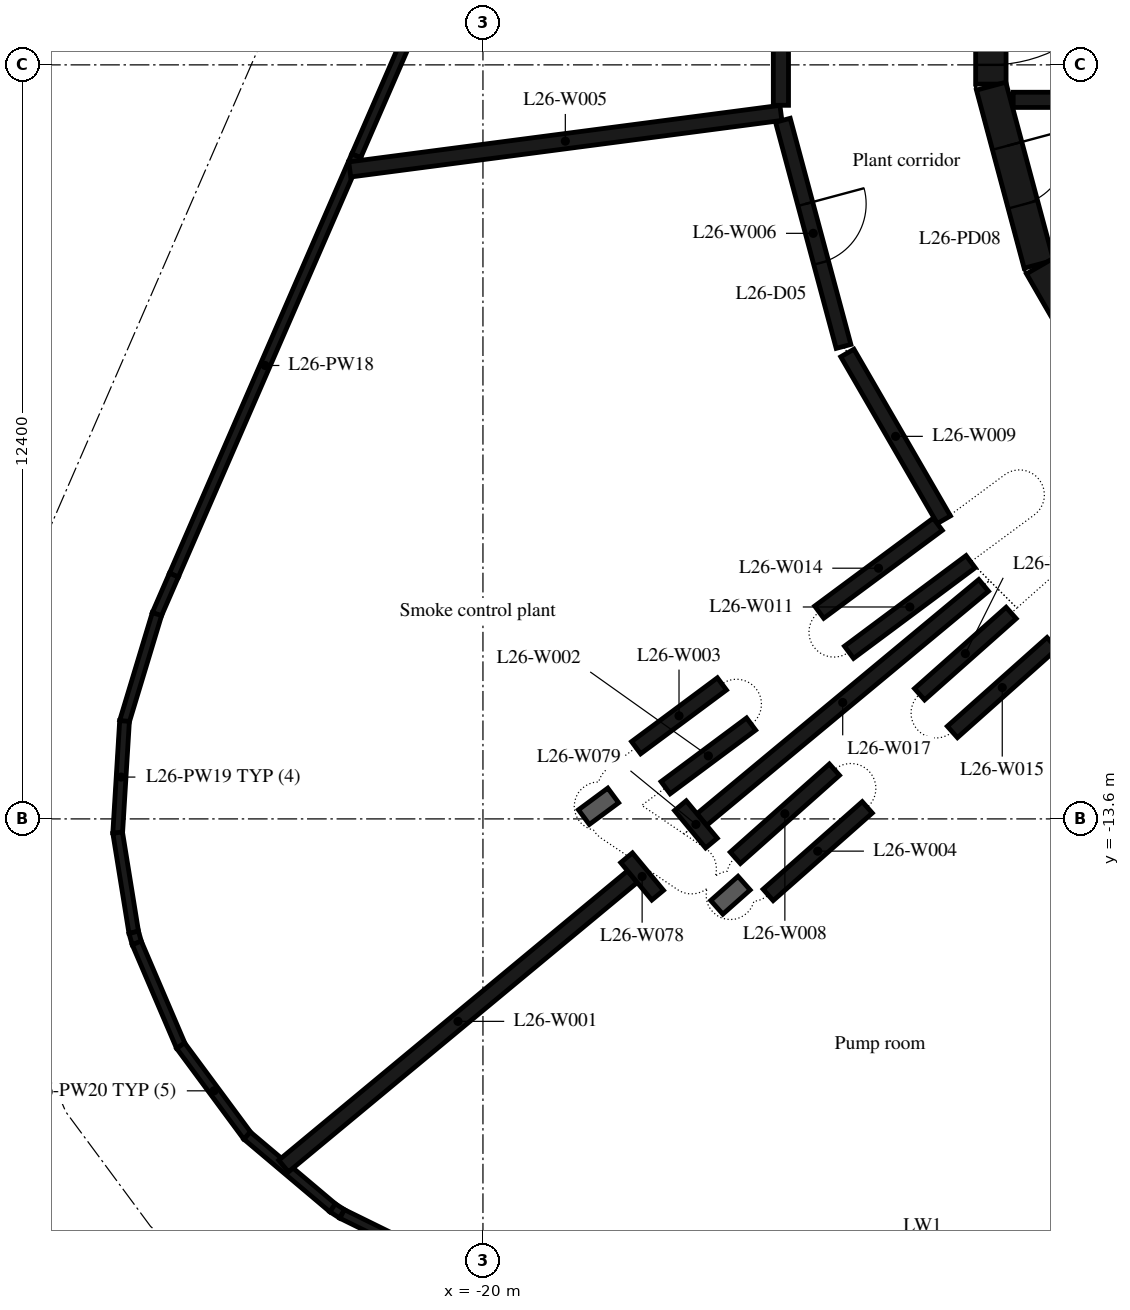
"""IFC4 building model, lengths in metres.
Left out: names, types, materials, properties, quantities, classifications, styles, units other than length and angle.
Written with IfcOpenShell. Run it as: python <this file> out.ifc"""

import sys

from ifc_helpers import new_model, si_unit, direction, frame, frame_2d, origin, place, context, subcontext, project, spatial, rectangle, extrude, element, fill, save


model = new_model("IFC4")
c1 = context("Model", 3, precision=1e-05, world=origin(), true_north=direction((0.0, 1.0)))
c2 = subcontext(c1, "Body", "Model", "MODEL_VIEW")
j1 = project(units=[si_unit("LENGTHUNIT", "METRE"), si_unit("PLANEANGLEUNIT", "RADIAN")], contexts=[c1])
p1 = place(None, origin())
s1 = spatial("IfcSite", under=j1, at=p1, CompositionType="ELEMENT")
p2 = place(p1, origin())
s2 = spatial("IfcBuilding", under=s1, at=p2, CompositionType="ELEMENT")
p3 = place(p2, frame((0.0, 0.0, 108.2)))
s3 = spatial("IfcBuildingStorey", under=s2, at=p3, CompositionType="ELEMENT", Elevation=108.2)
p4 = place(p3, frame((-19.086, 4.199, 0.0), z_axis=(0.0, 0.0, 1.0), x_axis=(-0.398765291981, -0.917053020229, 0.0)))
e1 = element("IfcWall", 1, at=p4, inside=s3, PredefinedType="STANDARD", context=c2, shape_type="SweptSolid", body=[
    extrude(rectangle(XDim=7.519, YDim=0.16, at=frame_2d((3.76, 0.0))), origin(), (0.0, 0.0, 1.0), 4.75),
])
p5 = place(p3, frame((-22.084, -2.696, 0.0), z_axis=(0.0, 0.0, 1.0), x_axis=(-0.398737984544, -0.917064893932, 0.0)))
e2 = element("IfcWall", 2, at=p5, inside=s3, PredefinedType="STANDARD", context=c2, shape_type="SweptSolid", body=[
    extrude(rectangle(XDim=7.519, YDim=0.16, at=frame_2d((3.759, 0.0))), origin(), (0.0, 0.0, 1.0), 4.75),
])
p6 = place(p3, frame((-25.082, -9.591, 0.0), z_axis=(0.0, 0.0, 1.0), x_axis=(-0.398561214502, -0.917141732937, 0.0)))
e3 = element("IfcWall", 3, at=p6, inside=s3, PredefinedType="STANDARD", context=c2, shape_type="SweptSolid", body=[
    extrude(rectangle(XDim=0.704, YDim=0.16, at=frame_2d((0.352, 0.0))), origin(), (0.0, 0.0, 1.0), 4.75),
])
p7 = place(p3, frame((-25.361, -10.232, 0.0), z_axis=(0.0, 0.0, 1.0), x_axis=(-0.289640305578, -0.957135566879, 0.0)))
e4 = element("IfcWall", 4, at=p7, inside=s3, PredefinedType="STANDARD", context=c2, shape_type="SweptSolid", body=[
    extrude(rectangle(XDim=1.846, YDim=0.16, at=frame_2d((0.923, 0.0))), origin(), (0.0, 0.0, 1.0), 4.75),
])
p8 = place(p3, frame((-25.894, -11.99, 0.0), z_axis=(0.0, 0.0, 1.0), x_axis=(-0.061029488501, -0.998135963451, 0.0)))
e5 = element("IfcWall", 5, at=p8, inside=s3, PredefinedType="STANDARD", context=c2, shape_type="SweptSolid", body=[
    extrude(rectangle(XDim=1.848, YDim=0.16, at=frame_2d((0.924, 0.0))), origin(), (0.0, 0.0, 1.0), 4.75),
])
p9 = place(p3, frame((-26.008, -13.826, 0.0), z_axis=(0.0, 0.0, 1.0), x_axis=(0.159320235268, -0.98722695599, 0.0)))
e6 = element("IfcWall", 6, at=p9, inside=s3, PredefinedType="STANDARD", context=c2, shape_type="SweptSolid", body=[
    extrude(rectangle(XDim=1.661, YDim=0.16, at=frame_2d((0.831, 0.0))), origin(), (0.0, 0.0, 1.0), 4.75),
])
p10 = place(p3, frame((-25.743, -15.466, 0.0), z_axis=(0.0, 0.0, 1.0), x_axis=(0.274547625783, -0.961573502743, 0.0)))
e7 = element("IfcWall", 7, at=p10, inside=s3, PredefinedType="STANDARD", context=c2, shape_type="SweptSolid", body=[
    extrude(rectangle(XDim=0.186, YDim=0.16, at=frame_2d((0.093, 0.0))), origin(), (0.0, 0.0, 1.0), 4.75),
])
p11 = place(p3, frame((-25.694, -15.639, 0.0), z_axis=(0.0, 0.0, 1.0), x_axis=(0.393376641472, -0.919377407784, 0.0)))
e8 = element("IfcWall", 8, at=p11, inside=s3, PredefinedType="STANDARD", context=c2, shape_type="SweptSolid", body=[
    extrude(rectangle(XDim=1.846, YDim=0.16, at=frame_2d((0.923, 0.0))), origin(), (0.0, 0.0, 1.0), 4.75),
])
p12 = place(p3, frame((-24.972, -17.329, 0.0), z_axis=(0.0, 0.0, 1.0), x_axis=(0.594788380253, -0.803882318947, 0.0)))
e9 = element("IfcWall", 9, at=p12, inside=s3, PredefinedType="STANDARD", context=c2, shape_type="SweptSolid", body=[
    extrude(rectangle(XDim=1.848, YDim=0.16, at=frame_2d((0.924, 0.0))), origin(), (0.0, 0.0, 1.0), 4.75),
])
p13 = place(p3, frame((-23.879, -18.808, 0.0), z_axis=(0.0, 0.0, 1.0), x_axis=(0.76410813609, -0.645088177198, 0.0)))
e10 = element("IfcWall", 10, at=p13, inside=s3, PredefinedType="STANDARD", context=c2, shape_type="SweptSolid", body=[
    extrude(rectangle(XDim=1.846, YDim=0.16, at=frame_2d((0.923, 0.0))), origin(), (0.0, 0.0, 1.0), 4.75),
])
p14 = place(p3, frame((-22.472, -19.995, 0.0), z_axis=(0.0, 0.0, 1.0), x_axis=(0.840238765122, -0.542216578118, 0.0)))
e11 = element("IfcWall", 11, at=p14, inside=s3, PredefinedType="STANDARD", context=c2, shape_type="SweptSolid", body=[
    extrude(rectangle(XDim=0.186, YDim=0.16, at=frame_2d((0.093, 0.0))), origin(), (0.0, 0.0, 1.0), 4.75),
])
p15 = place(p3, frame((-22.316, -20.096, 0.0), z_axis=(0.0, 0.0, 1.0), x_axis=(0.897492078532, -0.441030576007, 0.0)))
e12 = element("IfcWall", 12, at=p15, inside=s3, PredefinedType="STANDARD", context=c2, shape_type="SweptSolid", body=[
    extrude(rectangle(XDim=1.661, YDim=0.16, at=frame_2d((0.831, 0.0))), origin(), (0.0, 0.0, 1.0), 4.75),
])
p16 = place(p3, frame((-16.505, -21.182, 0.0), z_axis=(0.0, 0.0, 1.0), x_axis=(0.993573424553, 0.113189443072, 0.0)))
e13 = element("IfcWall", 13, at=p16, inside=s3, PredefinedType="STANDARD", context=c2, shape_type="SweptSolid", body=[
    extrude(rectangle(XDim=7.519, YDim=0.16, at=frame_2d((3.76, 0.0))), origin(), (0.0, 0.0, 1.0), 4.75),
])
p17 = place(p16, frame((2.26, 0.0, 1.0)))
e14 = element("IfcOpeningElement", 14, at=p17, cuts=e13, PredefinedType="OPENING", context=c2, shape_type="SweptSolid", body=[
    extrude(rectangle(XDim=3.0, YDim=2.2, at=frame_2d((1.5, 1.1))), frame((0.0, 0.09, 0.0), z_axis=(0.0, -1.0, 0.0), x_axis=(1.0, 0.0, 0.0)), (0.0, 0.0, 1.0), 0.18),
])
p18 = place(p3, frame((-11.647, 1.516, 0.0), z_axis=(0.0, 0.0, 1.0), x_axis=(0.0, -1.0, 0.0)))
e15 = element("IfcWall", 15, at=p18, inside=s3, PredefinedType="SHEAR", context=c2, shape_type="SweptSolid", body=[
    extrude(rectangle(XDim=3.033, YDim=0.5, at=frame_2d((1.516, 0.0))), origin(), (0.0, 0.0, 1.0), 4.75),
])
p19 = place(p18, frame((0.316, 0.0, 0.0)))
e16 = element("IfcOpeningElement", 16, at=p19, cuts=e15, PredefinedType="OPENING", context=c2, shape_type="SweptSolid", body=[
    extrude(rectangle(XDim=2.4, YDim=2.1, at=frame_2d((1.2, 1.05))), frame((0.0, 0.26, 0.0), z_axis=(0.0, -1.0, 0.0), x_axis=(1.0, 0.0, 0.0)), (0.0, 0.0, 1.0), 0.52),
])
p20 = place(p3, frame((-11.643, -1.55, 0.0), z_axis=(0.0, 0.0, 1.0), x_axis=(0.258734743916, -0.965948410781, 0.0)))
e17 = element("IfcWall", 17, at=p20, inside=s3, PredefinedType="SHEAR", context=c2, shape_type="SweptSolid", body=[
    extrude(rectangle(XDim=3.033, YDim=0.5, at=frame_2d((1.516, 0.0))), origin(), (0.0, 0.0, 1.0), 4.75),
])
p21 = place(p20, frame((1.016, 0.0, 0.0)))
e18 = element("IfcOpeningElement", 18, at=p21, cuts=e17, PredefinedType="OPENING", context=c2, shape_type="SweptSolid", body=[
    extrude(rectangle(XDim=1.0, YDim=2.4, at=frame_2d((0.5, 1.2))), frame((0.0, 0.26, 0.0), z_axis=(0.0, -1.0, 0.0), x_axis=(1.0, 0.0, 0.0)), (0.0, 0.0, 1.0), 0.52),
])
p22 = place(p3, frame((-10.845, -4.51, 0.0), z_axis=(0.0, 0.0, 1.0), x_axis=(0.500087131594, -0.865975092491, 0.0)))
e19 = element("IfcWall", 19, at=p22, inside=s3, PredefinedType="SHEAR", context=c2, shape_type="SweptSolid", body=[
    extrude(rectangle(XDim=3.033, YDim=0.5, at=frame_2d((1.516, 0.0))), origin(), (0.0, 0.0, 1.0), 4.75),
])
p23 = place(p3, frame((-11.28, -1.775, 0.0), z_axis=(0.0, 0.0, 1.0), x_axis=(1.0, 0.0, 0.0)))
e20 = element("IfcWall", 20, at=p23, inside=s3, PredefinedType="SHEAR", context=c2, shape_type="SweptSolid", body=[
    extrude(rectangle(XDim=14.38, YDim=0.25, at=frame_2d((7.19, 0.0))), origin(), (0.0, 0.0, 1.0), 4.75),
])
p24 = place(p23, frame((9.705, 0.0, 0.0)))
e21 = element("IfcOpeningElement", 21, at=p24, cuts=e20, PredefinedType="OPENING", context=c2, shape_type="SweptSolid", body=[
    extrude(rectangle(XDim=1.0, YDim=2.4, at=frame_2d((0.5, 1.2))), frame((0.0, 0.135, 0.0), z_axis=(0.0, -1.0, 0.0), x_axis=(1.0, 0.0, 0.0)), (0.0, 0.0, 1.0), 0.27),
])
p25 = place(p3, frame((-17.542, -14.55, 0.0), z_axis=(0.0, 0.0, 1.0), x_axis=(-0.769578133533, -0.638552657491, 0.0)))
e22 = element("IfcWall", 22, at=p25, inside=s3, PredefinedType="PARTITIONING", context=c2, shape_type="SweptSolid", body=[
    extrude(rectangle(XDim=7.453, YDim=0.25, at=frame_2d((3.727, 0.0))), origin(), (0.0, 0.0, 1.0), 4.75),
])
p26 = place(p3, frame((-16.997, -13.087, 0.0), z_axis=(0.0, 0.0, 1.0), x_axis=(0.802183588965, 0.597077456948, 0.0)))
e23 = element("IfcWall", 23, at=p26, inside=s3, PredefinedType="PARTITIONING", context=c2, shape_type="SweptSolid", body=[
    extrude(rectangle(XDim=1.753, YDim=0.25, at=frame_2d((0.877, 0.0))), origin(), (0.0, 0.0, 1.0), 4.75),
])
p27 = place(p3, frame((-16.07, -11.38, 0.0), z_axis=(0.0, 0.0, 1.0), x_axis=(-0.802508356636, -0.596640878191, 0.0)))
e24 = element("IfcWall", 24, at=p27, inside=s3, PredefinedType="PARTITIONING", context=c2, shape_type="SweptSolid", body=[
    extrude(rectangle(XDim=1.759, YDim=0.25, at=frame_2d((0.879, 0.0))), origin(), (0.0, 0.0, 1.0), 4.75),
])
p28 = place(p3, frame((-15.31, -14.85, 0.0), z_axis=(0.0, 0.0, 1.0), x_axis=(0.749418447052, 0.662096663047, 0.0)))
e25 = element("IfcWall", 25, at=p28, inside=s3, PredefinedType="PARTITIONING", context=c2, shape_type="SweptSolid", body=[
    extrude(rectangle(XDim=2.175, YDim=0.25, at=frame_2d((1.088, 0.0))), origin(), (0.0, 0.0, 1.0), 4.75),
])
p29 = place(p3, frame((-15.1, -1.99, 0.0), z_axis=(0.0, 0.0, 1.0), x_axis=(-0.991513570941, -0.130003225498, 0.0)))
e26 = element("IfcWall", 26, at=p29, inside=s3, PredefinedType="PARTITIONING", context=c2, shape_type="SweptSolid", body=[
    extrude(rectangle(XDim=7.151, YDim=0.25, at=frame_2d((3.576, 0.0))), origin(), (0.0, 0.0, 1.0), 4.75),
])
p30 = place(p3, frame((-15.068, -2.111, 0.0), z_axis=(0.0, 0.0, 1.0), x_axis=(0.259059323171, -0.965861411942, 0.0)))
e27 = element("IfcWall", 27, at=p30, inside=s3, PredefinedType="PARTITIONING", context=c2, shape_type="SweptSolid", body=[
    extrude(rectangle(XDim=3.851, YDim=0.25, at=frame_2d((1.925, 0.0))), origin(), (0.0, 0.0, 1.0), 4.75),
])
p31 = place(p30, frame((1.425, 0.0, 0.0)))
e28 = element("IfcOpeningElement", 28, at=p31, cuts=e27, PredefinedType="OPENING", context=c2, shape_type="SweptSolid", body=[
    extrude(rectangle(XDim=1.0, YDim=2.1, at=frame_2d((0.5, 1.05))), frame((0.0, 0.135, 0.0), z_axis=(0.0, -1.0, 0.0), x_axis=(1.0, 0.0, 0.0)), (0.0, 0.0, 1.0), 0.27),
])
p32 = place(p3, frame((-15.1, 1.99, 0.0), z_axis=(0.0, 0.0, 1.0), x_axis=(0.0, -1.0, 0.0)))
e29 = element("IfcWall", 29, at=p32, inside=s3, PredefinedType="PARTITIONING", context=c2, shape_type="SweptSolid", body=[
    extrude(rectangle(XDim=3.855, YDim=0.25, at=frame_2d((1.927, 0.0))), origin(), (0.0, 0.0, 1.0), 4.75),
])
p33 = place(p32, frame((1.427, 0.0, 0.0)))
e30 = element("IfcOpeningElement", 30, at=p33, cuts=e29, PredefinedType="OPENING", context=c2, shape_type="SweptSolid", body=[
    extrude(rectangle(XDim=1.0, YDim=2.1, at=frame_2d((0.5, 1.05))), frame((0.0, 0.135, 0.0), z_axis=(0.0, -1.0, 0.0), x_axis=(1.0, 0.0, 0.0)), (0.0, 0.0, 1.0), 0.27),
])
p34 = place(p3, frame((-14.22, -12.79, 0.0), z_axis=(0.0, 0.0, 1.0), x_axis=(-0.747193185721, -0.664606908791, 0.0)))
e31 = element("IfcWall", 31, at=p34, inside=s3, PredefinedType="PARTITIONING", context=c2, shape_type="SweptSolid", body=[
    extrude(rectangle(XDim=2.182, YDim=0.25, at=frame_2d((1.091, 0.0))), origin(), (0.0, 0.0, 1.0), 4.75),
])
p35 = place(p3, frame((-14.007, -5.938, 0.0), z_axis=(0.0, 0.0, 1.0), x_axis=(0.501060572221, -0.865412215632, 0.0)))
e32 = element("IfcWall", 32, at=p35, inside=s3, PredefinedType="PARTITIONING", context=c2, shape_type="SweptSolid", body=[
    extrude(rectangle(XDim=3.168, YDim=0.25, at=frame_2d((1.584, 0.0))), origin(), (0.0, 0.0, 1.0), 4.75),
])
p36 = place(p3, frame((-13.98, -10.86, 0.0), z_axis=(0.0, 0.0, 1.0), x_axis=(0.80192236943, 0.597428249589, 0.0)))
e33 = element("IfcWall", 33, at=p36, inside=s3, PredefinedType="PARTITIONING", context=c2, shape_type="SweptSolid", body=[
    extrude(rectangle(XDim=2.494, YDim=0.25, at=frame_2d((1.247, 0.0))), origin(), (0.0, 0.0, 1.0), 4.75),
])
p37 = place(p3, frame((-12.521, -8.754, 0.0), z_axis=(0.0, 0.0, 1.0), x_axis=(-0.803259492536, -0.595629236732, 0.0)))
e34 = element("IfcWall", 34, at=p37, inside=s3, PredefinedType="PARTITIONING", context=c2, shape_type="SweptSolid", body=[
    extrude(rectangle(XDim=2.427, YDim=0.25, at=frame_2d((1.213, 0.0))), origin(), (0.0, 0.0, 1.0), 4.75),
])
p38 = place(p3, frame((-12.28, -12.17, 0.0), z_axis=(0.0, 0.0, 1.0), x_axis=(0.746942923143, 0.664888163202, 0.0)))
e35 = element("IfcWall", 35, at=p38, inside=s3, PredefinedType="PARTITIONING", context=c2, shape_type="SweptSolid", body=[
    extrude(rectangle(XDim=2.196, YDim=0.25, at=frame_2d((1.098, 0.0))), origin(), (0.0, 0.0, 1.0), 4.75),
])
p39 = place(p3, frame((-11.766, -9.76, 0.0), z_axis=(0.0, 0.0, 1.0), x_axis=(-0.769226522348, -0.63897617899, 0.0)))
e36 = element("IfcWall", 36, at=p39, inside=s3, PredefinedType="PARTITIONING", context=c2, shape_type="SweptSolid", body=[
    extrude(rectangle(XDim=6.026, YDim=0.25, at=frame_2d((3.013, 0.0))), origin(), (0.0, 0.0, 1.0), 4.75),
])
p40 = place(p3, frame((-11.313, -10.213, 0.0), z_axis=(0.0, 0.0, 1.0), x_axis=(-0.747910613197, -0.663799453651, 0.0)))
e37 = element("IfcWall", 37, at=p40, inside=s3, PredefinedType="PARTITIONING", context=c2, shape_type="SweptSolid", body=[
    extrude(rectangle(XDim=2.014, YDim=0.25, at=frame_2d((1.007, 0.0))), origin(), (0.0, 0.0, 1.0), 4.75),
])
p41 = place(p3, frame((-17.127, -14.854, 0.0), z_axis=(0.0, 0.0, 1.0), x_axis=(-0.638591701228, 0.769545735562, 0.0)))
e38 = element("IfcWall", 38, at=p41, inside=s3, PredefinedType="PARTITIONING", context=c2, shape_type="SweptSolid", body=[
    extrude(rectangle(XDim=0.8, YDim=0.25, at=frame_2d((0.4, 0.0))), origin(), (0.0, 0.0, 1.0), 4.75),
])
p42 = place(p3, frame((-16.753, -13.383, 0.0), z_axis=(0.0, 0.0, 1.0), x_axis=(0.638772420088, -0.769395733895, 0.0)))
e39 = element("IfcWall", 39, at=p42, inside=s3, PredefinedType="PARTITIONING", context=c2, shape_type="SweptSolid", body=[
    extrude(rectangle(XDim=0.8, YDim=0.25, at=frame_2d((0.4, 0.0))), origin(), (0.0, 0.0, 1.0), 4.75),
])
p43 = place(p19, origin())
e40 = element("IfcDoor", 40, at=p43, inside=s3, OperationType="DOUBLE_DOOR_SINGLE_SWING", PredefinedType="DOOR", context=c2, shape_type="SweptSolid", body=[
    extrude(rectangle(XDim=2.4, YDim=2.1, at=frame_2d((1.2, 1.05))), frame((0.0, 0.025, 0.0), z_axis=(0.0, -1.0, 0.0), x_axis=(1.0, 0.0, 0.0)), (0.0, 0.0, 1.0), 0.05),
])
fill(e16, e40)
p44 = place(p21, origin())
e41 = element("IfcDoor", 41, at=p44, inside=s3, OperationType="SINGLE_SWING_LEFT", PredefinedType="DOOR", context=c2, shape_type="SweptSolid", body=[
    extrude(rectangle(XDim=1.0, YDim=2.4, at=frame_2d((0.5, 1.2))), frame((0.0, 0.025, 0.0), z_axis=(0.0, -1.0, 0.0), x_axis=(1.0, 0.0, 0.0)), (0.0, 0.0, 1.0), 0.05),
])
fill(e18, e41)
p45 = place(p31, origin())
e42 = element("IfcDoor", 42, at=p45, inside=s3, OperationType="SINGLE_SWING_LEFT", PredefinedType="DOOR", context=c2, shape_type="SweptSolid", body=[
    extrude(rectangle(XDim=1.0, YDim=2.1, at=frame_2d((0.5, 1.05))), frame((0.0, 0.025, 0.0), z_axis=(0.0, -1.0, 0.0), x_axis=(1.0, 0.0, 0.0)), (0.0, 0.0, 1.0), 0.05),
])
fill(e28, e42)
save(model, sys.argv[1])
